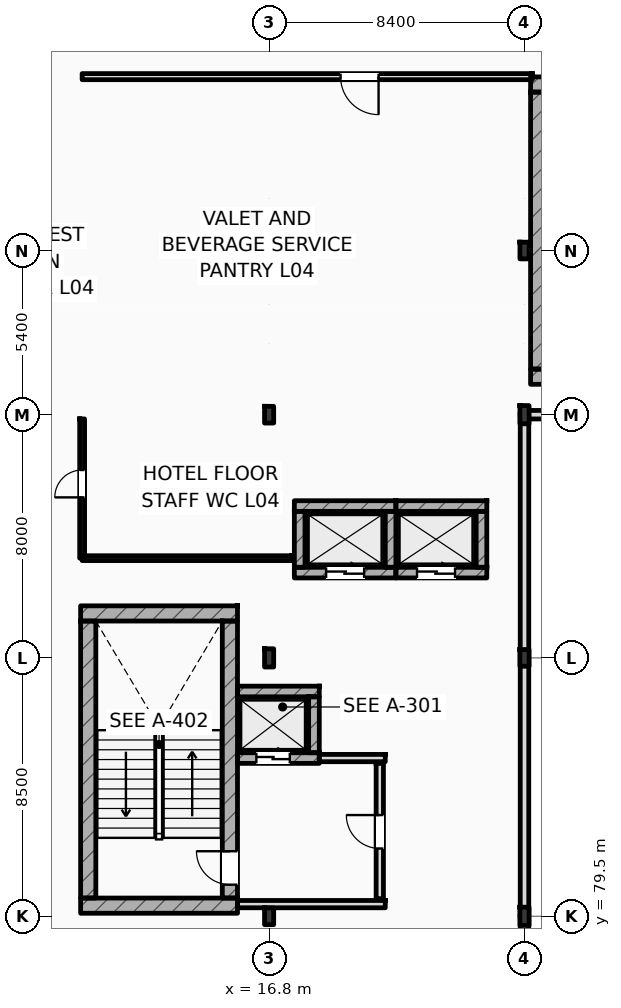
"""IFC4 building model, lengths in metres.
Left out: names, types, materials, properties, quantities, classifications, styles, units other than length and angle.
Written with IfcOpenShell. Run it as: python <this file> out.ifc"""

import sys

from ifc_helpers import new_model, si_unit, direction, frame, frame_2d, origin, origin_2d, place, context, subcontext, project, spatial, rectangle, i_section, extrude, element, fill, save


model = new_model("IFC4")
c1 = context("Model", 3, precision=1e-05, world=origin(), true_north=direction((0.0, 1.0)))
c2 = subcontext(c1, "Body", "Model", "MODEL_VIEW")
j1 = project(units=[si_unit("LENGTHUNIT", "METRE"), si_unit("PLANEANGLEUNIT", "RADIAN")], contexts=[c1])
p1 = place(None, origin())
s1 = spatial("IfcSite", under=j1, at=p1, CompositionType="ELEMENT")
p2 = place(p1, origin())
s2 = spatial("IfcBuilding", under=s1, at=p2, CompositionType="ELEMENT")
p3 = place(p2, frame((0.0, 0.0, 20.4)))
s3 = spatial("IfcBuildingStorey", under=s2, at=p3, CompositionType="ELEMENT", Elevation=20.4)
p4 = place(p3, frame((16.8, 79.5, 0.0), z_axis=(0.0, 0.0, 1.0), x_axis=(1.0, 0.0, 0.0)))
e1 = element("IfcColumn", 1, at=p4, inside=s3, PredefinedType="COLUMN", context=c2, shape_type="SweptSolid", body=[
    extrude(i_section(OverallWidth=0.3, OverallDepth=0.55, WebThickness=0.015, FlangeThickness=0.029, FilletRadius=0.027, at=origin_2d()), origin(), (0.0, 0.0, 1.0), 4.2),
])
p5 = place(p3, frame((16.8, 88.0, 0.0), z_axis=(0.0, 0.0, 1.0), x_axis=(1.0, 0.0, 0.0)))
e2 = element("IfcColumn", 2, at=p5, inside=s3, PredefinedType="COLUMN", context=c2, shape_type="SweptSolid", body=[
    extrude(i_section(OverallWidth=0.3, OverallDepth=0.6, WebThickness=0.015, FlangeThickness=0.03, FilletRadius=0.027, at=origin_2d()), origin(), (0.0, 0.0, 1.0), 4.2),
])
p6 = place(p3, frame((16.8, 96.0, 0.0), z_axis=(0.0, 0.0, 1.0), x_axis=(1.0, 0.0, 0.0)))
e3 = element("IfcColumn", 3, at=p6, inside=s3, PredefinedType="COLUMN", context=c2, shape_type="SweptSolid", body=[
    extrude(i_section(OverallWidth=0.3, OverallDepth=0.55, WebThickness=0.015, FlangeThickness=0.029, FilletRadius=0.027, at=origin_2d()), origin(), (0.0, 0.0, 1.0), 4.2),
])
p7 = place(p3, frame((25.2, 79.5, 0.0), z_axis=(0.0, 0.0, 1.0), x_axis=(1.0, 0.0, 0.0)))
e4 = element("IfcColumn", 4, at=p7, inside=s3, PredefinedType="COLUMN", context=c2, shape_type="SweptSolid", body=[
    extrude(i_section(OverallWidth=0.3, OverallDepth=0.6, WebThickness=0.015, FlangeThickness=0.03, FilletRadius=0.027, at=origin_2d()), origin(), (0.0, 0.0, 1.0), 4.2),
])
p8 = place(p3, frame((25.2, 88.0, 0.0), z_axis=(0.0, 0.0, 1.0), x_axis=(1.0, 0.0, 0.0)))
e5 = element("IfcColumn", 5, at=p8, inside=s3, PredefinedType="COLUMN", context=c2, shape_type="SweptSolid", body=[
    extrude(i_section(OverallWidth=0.3, OverallDepth=0.55, WebThickness=0.015, FlangeThickness=0.029, FilletRadius=0.027, at=origin_2d()), origin(), (0.0, 0.0, 1.0), 4.2),
])
p9 = place(p3, frame((25.2, 96.0, 0.0), z_axis=(0.0, 0.0, 1.0), x_axis=(1.0, 0.0, 0.0)))
e6 = element("IfcColumn", 6, at=p9, inside=s3, PredefinedType="COLUMN", context=c2, shape_type="SweptSolid", body=[
    extrude(i_section(OverallWidth=0.3, OverallDepth=0.6, WebThickness=0.015, FlangeThickness=0.03, FilletRadius=0.027, at=origin_2d()), origin(), (0.0, 0.0, 1.0), 4.2),
])
for number, where, z_axis, x_axis in (
    (7, (16.8, 101.4, 0.0), (0.0, 0.0, 1.0), (1.0, 0.0, 0.0)),
    (8, (25.2, 101.4, 0.0), (0.0, 0.0, 1.0), (1.0, 0.0, 0.0)),
):
    element("IfcColumn", number, at=place(p3, frame(where, z_axis=z_axis, x_axis=x_axis)), inside=s3, PredefinedType="COLUMN", context=c2, shape_type="SweptSolid", body=[
        extrude(i_section(OverallWidth=0.3, OverallDepth=0.55, WebThickness=0.015, FlangeThickness=0.029, FilletRadius=0.027, at=origin_2d()), origin(), (0.0, 0.0, 1.0), 4.2),
    ])
for number, where, z_axis, x_axis in (
    (9, (10.6, 89.462, 0.0), (0.0, 0.0, 1.0), (1.0, 0.0, 0.0)),
    (10, (10.6, 79.85, 0.0), (0.0, 0.0, 1.0), (1.0, 0.0, 0.0)),
):
    element("IfcWall", number, at=place(p3, frame(where, z_axis=z_axis, x_axis=x_axis)), inside=s3, PredefinedType="SHEAR", context=c2, shape_type="SweptSolid", body=[
        extrude(rectangle(XDim=5.16, YDim=0.5, at=frame_2d((2.58, 0.0))), origin(), (0.0, 0.0, 1.0), 4.2),
    ])
p10 = place(p3, frame((10.85, 80.1, 0.0), z_axis=(0.0, 0.0, 1.0), x_axis=(0.0, 1.0, 0.0)))
e11 = element("IfcWall", 11, at=p10, inside=s3, PredefinedType="SHEAR", context=c2, shape_type="SweptSolid", body=[
    extrude(rectangle(XDim=9.112, YDim=0.5, at=frame_2d((4.556, 0.0))), origin(), (0.0, 0.0, 1.0), 4.2),
])
p11 = place(p3, frame((15.51, 80.1, 0.0), z_axis=(0.0, 0.0, 1.0), x_axis=(0.0, 1.0, 0.0)))
e12 = element("IfcWall", 12, at=p11, inside=s3, PredefinedType="SHEAR", context=c2, shape_type="SweptSolid", body=[
    extrude(rectangle(XDim=9.112, YDim=0.5, at=frame_2d((4.556, 0.0))), origin(), (0.0, 0.0, 1.0), 4.2),
])
p12 = place(p11, frame((0.44, 0.0, 0.0)))
e13 = element("IfcOpeningElement", 13, at=p12, cuts=e12, PredefinedType="OPENING", context=c2, shape_type="SweptSolid", body=[
    extrude(rectangle(XDim=1.1, YDim=2.2, at=frame_2d((0.55, 1.1))), frame((0.0, 0.26, 0.0), z_axis=(0.0, -1.0, 0.0), x_axis=(1.0, 0.0, 0.0)), (0.0, 0.0, 1.0), 0.52),
])
for number, where, z_axis, x_axis in (
    (14, (25.4, 106.862, 0.0), (0.0, 0.0, 1.0), (1.0, 0.0, 0.0)),
    (15, (25.4, 97.25, 0.0), (0.0, 0.0, 1.0), (1.0, 0.0, 0.0)),
):
    element("IfcWall", number, at=place(p3, frame(where, z_axis=z_axis, x_axis=x_axis)), inside=s3, PredefinedType="SHEAR", context=c2, shape_type="SweptSolid", body=[
        extrude(rectangle(XDim=5.16, YDim=0.5, at=frame_2d((2.58, 0.0))), origin(), (0.0, 0.0, 1.0), 4.2),
    ])
p13 = place(p3, frame((25.65, 97.5, 0.0), z_axis=(0.0, 0.0, 1.0), x_axis=(0.0, 1.0, 0.0)))
e16 = element("IfcWall", 16, at=p13, inside=s3, PredefinedType="SHEAR", context=c2, shape_type="SweptSolid", body=[
    extrude(rectangle(XDim=9.112, YDim=0.5, at=frame_2d((4.556, 0.0))), origin(), (0.0, 0.0, 1.0), 4.2),
])
p14 = place(p3, frame((25.2, 96.0, 0.0), z_axis=(0.0, 0.0, 1.0), x_axis=(1.0, 0.0, 0.0)))
e17 = element("IfcWall", 17, at=p14, inside=s3, PredefinedType="STANDARD", context=c2, shape_type="SweptSolid", body=[
    extrude(rectangle(XDim=23.4, YDim=0.28, at=frame_2d((11.7, 0.0))), origin(), (0.0, 0.0, 1.0), 3.48),
])
p15 = place(p3, frame((25.2, 62.5, 0.0), z_axis=(0.0, 0.0, 1.0), x_axis=(0.0, 1.0, 0.0)))
e18 = element("IfcWall", 18, at=p15, inside=s3, PredefinedType="STANDARD", context=c2, shape_type="SweptSolid", body=[
    extrude(rectangle(XDim=17.0, YDim=0.28, at=frame_2d((8.5, 0.0))), origin(), (0.0, 0.0, 1.0), 3.53),
])
p16 = place(p3, frame((25.2, 79.5, 0.0), z_axis=(0.0, 0.0, 1.0), x_axis=(0.0, 1.0, 0.0)))
e19 = element("IfcWall", 19, at=p16, inside=s3, PredefinedType="STANDARD", context=c2, shape_type="SweptSolid", body=[
    extrude(rectangle(XDim=16.5, YDim=0.28, at=frame_2d((8.25, 0.0))), origin(), (0.0, 0.0, 1.0), 3.53),
])
p17 = place(p3, frame((15.76, 86.895, 0.0), z_axis=(0.0, 0.0, 1.0), x_axis=(1.0, 0.0, 0.0)))
e20 = element("IfcWall", 20, at=p17, inside=s3, PredefinedType="SHEAR", context=c2, shape_type="SweptSolid", body=[
    extrude(rectangle(XDim=2.69, YDim=0.35, at=frame_2d((1.345, 0.0))), origin(), (0.0, 0.0, 1.0), 3.94),
])
p18 = place(p3, frame((15.76, 84.705, 0.0), z_axis=(0.0, 0.0, 1.0), x_axis=(1.0, 0.0, 0.0)))
e21 = element("IfcWall", 21, at=p18, inside=s3, PredefinedType="SHEAR", context=c2, shape_type="SweptSolid", body=[
    extrude(rectangle(XDim=2.69, YDim=0.35, at=frame_2d((1.345, 0.0))), origin(), (0.0, 0.0, 1.0), 3.94),
])
p19 = place(p18, frame((0.62, 0.0, 0.0)))
e22 = element("IfcOpeningElement", 22, at=p19, cuts=e21, PredefinedType="OPENING", context=c2, shape_type="SweptSolid", body=[
    extrude(rectangle(XDim=1.1, YDim=2.2, at=frame_2d((0.55, 1.1))), frame((0.0, 0.185, 0.0), z_axis=(0.0, -1.0, 0.0), x_axis=(1.0, 0.0, 0.0)), (0.0, 0.0, 1.0), 0.37),
])
p20 = place(p3, frame((18.275, 84.88, 0.0), z_axis=(0.0, 0.0, 1.0), x_axis=(0.0, 1.0, 0.0)))
e23 = element("IfcWall", 23, at=p20, inside=s3, PredefinedType="SHEAR", context=c2, shape_type="SweptSolid", body=[
    extrude(rectangle(XDim=1.84, YDim=0.35, at=frame_2d((0.92, 0.0))), origin(), (0.0, 0.0, 1.0), 3.94),
])
p21 = place(p3, frame((17.63, 92.995, 0.0), z_axis=(0.0, 0.0, 1.0), x_axis=(1.0, 0.0, 0.0)))
e24 = element("IfcWall", 24, at=p21, inside=s3, PredefinedType="SHEAR", context=c2, shape_type="SweptSolid", body=[
    extrude(rectangle(XDim=3.34, YDim=0.35, at=frame_2d((1.67, 0.0))), origin(), (0.0, 0.0, 1.0), 3.94),
])
p22 = place(p3, frame((17.63, 90.805, 0.0), z_axis=(0.0, 0.0, 1.0), x_axis=(1.0, 0.0, 0.0)))
e25 = element("IfcWall", 25, at=p22, inside=s3, PredefinedType="SHEAR", context=c2, shape_type="SweptSolid", body=[
    extrude(rectangle(XDim=3.34, YDim=0.35, at=frame_2d((1.67, 0.0))), origin(), (0.0, 0.0, 1.0), 3.94),
])
p23 = place(p22, frame((1.045, 0.0, 0.0)))
e26 = element("IfcOpeningElement", 26, at=p23, cuts=e25, PredefinedType="OPENING", context=c2, shape_type="SweptSolid", body=[
    extrude(rectangle(XDim=1.25, YDim=2.25, at=frame_2d((0.625, 1.125))), frame((0.0, 0.185, 0.0), z_axis=(0.0, -1.0, 0.0), x_axis=(1.0, 0.0, 0.0)), (0.0, 0.0, 1.0), 0.37),
])
for number, where, z_axis, x_axis in (
    (27, (17.805, 90.98, 0.0), (0.0, 0.0, 1.0), (0.0, 1.0, 0.0)),
    (28, (20.795, 90.98, 0.0), (0.0, 0.0, 1.0), (0.0, 1.0, 0.0)),
):
    element("IfcWall", number, at=place(p3, frame(where, z_axis=z_axis, x_axis=x_axis)), inside=s3, PredefinedType="SHEAR", context=c2, shape_type="SweptSolid", body=[
        extrude(rectangle(XDim=1.84, YDim=0.35, at=frame_2d((0.92, 0.0))), origin(), (0.0, 0.0, 1.0), 3.94),
    ])
p24 = place(p3, frame((20.97, 92.995, 0.0), z_axis=(0.0, 0.0, 1.0), x_axis=(1.0, 0.0, 0.0)))
e29 = element("IfcWall", 29, at=p24, inside=s3, PredefinedType="SHEAR", context=c2, shape_type="SweptSolid", body=[
    extrude(rectangle(XDim=2.99, YDim=0.35, at=frame_2d((1.495, 0.0))), origin(), (0.0, 0.0, 1.0), 3.94),
])
p25 = place(p3, frame((20.97, 90.805, 0.0), z_axis=(0.0, 0.0, 1.0), x_axis=(1.0, 0.0, 0.0)))
e30 = element("IfcWall", 30, at=p25, inside=s3, PredefinedType="SHEAR", context=c2, shape_type="SweptSolid", body=[
    extrude(rectangle(XDim=2.99, YDim=0.35, at=frame_2d((1.495, 0.0))), origin(), (0.0, 0.0, 1.0), 3.94),
])
p26 = place(p25, frame((0.695, 0.0, 0.0)))
e31 = element("IfcOpeningElement", 31, at=p26, cuts=e30, PredefinedType="OPENING", context=c2, shape_type="SweptSolid", body=[
    extrude(rectangle(XDim=1.25, YDim=2.25, at=frame_2d((0.625, 1.125))), frame((0.0, 0.185, 0.0), z_axis=(0.0, -1.0, 0.0), x_axis=(1.0, 0.0, 0.0)), (0.0, 0.0, 1.0), 0.37),
])
p27 = place(p3, frame((23.785, 90.98, 0.0), z_axis=(0.0, 0.0, 1.0), x_axis=(0.0, 1.0, 0.0)))
e32 = element("IfcWall", 32, at=p27, inside=s3, PredefinedType="SHEAR", context=c2, shape_type="SweptSolid", body=[
    extrude(rectangle(XDim=1.84, YDim=0.35, at=frame_2d((0.92, 0.0))), origin(), (0.0, 0.0, 1.0), 3.94),
])
p28 = place(p3, frame((15.76, 79.9, 0.0), z_axis=(0.0, 0.0, 1.0), x_axis=(1.0, 0.0, 0.0)))
e33 = element("IfcWall", 33, at=p28, inside=s3, PredefinedType="STANDARD", context=c2, shape_type="SweptSolid", body=[
    extrude(rectangle(XDim=4.86, YDim=0.24, at=frame_2d((2.43, 0.0))), origin(), (0.0, 0.0, 1.0), 3.94),
])
p29 = place(p3, frame((18.45, 84.705, 0.0), z_axis=(0.0, 0.0, 1.0), x_axis=(1.0, 0.0, 0.0)))
e34 = element("IfcWall", 34, at=p29, inside=s3, PredefinedType="STANDARD", context=c2, shape_type="SweptSolid", body=[
    extrude(rectangle(XDim=2.17, YDim=0.24, at=frame_2d((1.085, 0.0))), origin(), (0.0, 0.0, 1.0), 3.94),
])
p30 = place(p3, frame((20.44, 80.08, 0.0), z_axis=(0.0, 0.0, 1.0), x_axis=(0.0, 1.0, 0.0)))
e35 = element("IfcWall", 35, at=p30, inside=s3, PredefinedType="STANDARD", context=c2, shape_type="SweptSolid", body=[
    extrude(rectangle(XDim=4.45, YDim=0.24, at=frame_2d((2.225, 0.0))), origin(), (0.0, 0.0, 1.0), 3.94),
])
p31 = place(p30, frame((1.65, 0.0, 0.0)))
e36 = element("IfcOpeningElement", 36, at=p31, cuts=e35, PredefinedType="OPENING", context=c2, shape_type="SweptSolid", body=[
    extrude(rectangle(XDim=1.1, YDim=2.2, at=frame_2d((0.55, 1.1))), frame((0.0, 0.13, 0.0), z_axis=(0.0, -1.0, 0.0), x_axis=(1.0, 0.0, 0.0)), (0.0, 0.0, 1.0), 0.26),
])
p32 = place(p3, frame((10.65, 107.12, 0.0), z_axis=(0.0, 0.0, 1.0), x_axis=(1.0, 0.0, 0.0)))
e37 = element("IfcWall", 37, at=p32, inside=s3, PredefinedType="PARTITIONING", context=c2, shape_type="SweptSolid", body=[
    extrude(rectangle(XDim=14.8, YDim=0.2, at=frame_2d((7.4, 0.0))), origin(), (0.0, 0.0, 1.0), 3.94),
])
p33 = place(p32, frame((8.5, 0.0, 0.0)))
e38 = element("IfcOpeningElement", 38, at=p33, cuts=e37, PredefinedType="OPENING", context=c2, shape_type="SweptSolid", body=[
    extrude(rectangle(XDim=1.25, YDim=2.15, at=frame_2d((0.625, 1.075))), frame((0.0, 0.11, 0.0), z_axis=(0.0, -1.0, 0.0), x_axis=(1.0, 0.0, 0.0)), (0.0, 0.0, 1.0), 0.22),
])
p34 = place(p3, frame((10.65, 91.28, 0.0), z_axis=(0.0, 0.0, 1.0), x_axis=(0.0, 1.0, 0.0)))
e39 = element("IfcWall", 39, at=p34, inside=s3, PredefinedType="PARTITIONING", context=c2, shape_type="SweptSolid", body=[
    extrude(rectangle(XDim=4.58, YDim=0.16, at=frame_2d((2.29, 0.0))), origin(), (0.0, 0.0, 1.0), 3.94),
])
p35 = place(p34, frame((2.0, 0.0, 0.0)))
e40 = element("IfcOpeningElement", 40, at=p35, cuts=e39, PredefinedType="OPENING", context=c2, shape_type="SweptSolid", body=[
    extrude(rectangle(XDim=0.9, YDim=2.1, at=frame_2d((0.45, 1.05))), frame((0.0, 0.09, 0.0), z_axis=(0.0, -1.0, 0.0), x_axis=(1.0, 0.0, 0.0)), (0.0, 0.0, 1.0), 0.18),
])
p36 = place(p3, frame((10.65, 91.28, 0.0), z_axis=(0.0, 0.0, 1.0), x_axis=(1.0, 0.0, 0.0)))
e41 = element("IfcWall", 41, at=p36, inside=s3, PredefinedType="PARTITIONING", context=c2, shape_type="SweptSolid", body=[
    extrude(rectangle(XDim=6.9, YDim=0.16, at=frame_2d((3.45, 0.0))), origin(), (0.0, 0.0, 1.0), 3.94),
])
p37 = place(p12, origin())
e42 = element("IfcDoor", 42, at=p37, inside=s3, OperationType="SINGLE_SWING_RIGHT", PredefinedType="DOOR", context=c2, shape_type="SweptSolid", body=[
    extrude(rectangle(XDim=1.1, YDim=2.2, at=frame_2d((0.55, 1.1))), frame((0.0, 0.025, 0.0), z_axis=(0.0, -1.0, 0.0), x_axis=(1.0, 0.0, 0.0)), (0.0, 0.0, 1.0), 0.05),
])
fill(e13, e42)
p38 = place(p19, origin())
e43 = element("IfcDoor", 43, at=p38, inside=s3, OperationType="SLIDING_TO_LEFT", PredefinedType="DOOR", context=c2, shape_type="SweptSolid", body=[
    extrude(rectangle(XDim=1.1, YDim=2.2, at=frame_2d((0.55, 1.1))), frame((0.0, 0.025, 0.0), z_axis=(0.0, -1.0, 0.0), x_axis=(1.0, 0.0, 0.0)), (0.0, 0.0, 1.0), 0.05),
])
fill(e22, e43)
p39 = place(p23, origin())
e44 = element("IfcDoor", 44, at=p39, inside=s3, OperationType="SLIDING_TO_LEFT", PredefinedType="DOOR", context=c2, shape_type="SweptSolid", body=[
    extrude(rectangle(XDim=1.25, YDim=2.25, at=frame_2d((0.625, 1.125))), frame((0.0, 0.025, 0.0), z_axis=(0.0, -1.0, 0.0), x_axis=(1.0, 0.0, 0.0)), (0.0, 0.0, 1.0), 0.05),
])
fill(e26, e44)
p40 = place(p26, origin())
e45 = element("IfcDoor", 45, at=p40, inside=s3, OperationType="SLIDING_TO_LEFT", PredefinedType="DOOR", context=c2, shape_type="SweptSolid", body=[
    extrude(rectangle(XDim=1.25, YDim=2.25, at=frame_2d((0.625, 1.125))), frame((0.0, 0.025, 0.0), z_axis=(0.0, -1.0, 0.0), x_axis=(1.0, 0.0, 0.0)), (0.0, 0.0, 1.0), 0.05),
])
fill(e31, e45)
p41 = place(p31, origin())
e46 = element("IfcDoor", 46, at=p41, inside=s3, OperationType="SINGLE_SWING_RIGHT", PredefinedType="DOOR", context=c2, shape_type="SweptSolid", body=[
    extrude(rectangle(XDim=1.1, YDim=2.2, at=frame_2d((0.55, 1.1))), frame((0.0, 0.025, 0.0), z_axis=(0.0, -1.0, 0.0), x_axis=(1.0, 0.0, 0.0)), (0.0, 0.0, 1.0), 0.05),
])
fill(e36, e46)
p42 = place(p35, origin())
e47 = element("IfcDoor", 47, at=p42, inside=s3, OperationType="SINGLE_SWING_LEFT", PredefinedType="DOOR", context=c2, shape_type="SweptSolid", body=[
    extrude(rectangle(XDim=0.9, YDim=2.1, at=frame_2d((0.45, 1.05))), frame((0.0, 0.025, 0.0), z_axis=(0.0, -1.0, 0.0), x_axis=(1.0, 0.0, 0.0)), (0.0, 0.0, 1.0), 0.05),
])
fill(e40, e47)
p43 = place(p33, frame((1.25, 0.0, 0.0), z_axis=(0.0, 0.0, 1.0), x_axis=(-1.0, 0.0, 0.0)))
e48 = element("IfcDoor", 48, at=p43, inside=s3, OperationType="SINGLE_SWING_RIGHT", PredefinedType="DOOR", context=c2, shape_type="SweptSolid", body=[
    extrude(rectangle(XDim=1.25, YDim=2.15, at=frame_2d((0.625, 1.075))), frame((0.0, 0.025, 0.0), z_axis=(0.0, -1.0, 0.0), x_axis=(1.0, 0.0, 0.0)), (0.0, 0.0, 1.0), 0.05),
])
fill(e38, e48)
save(model, sys.argv[1])
